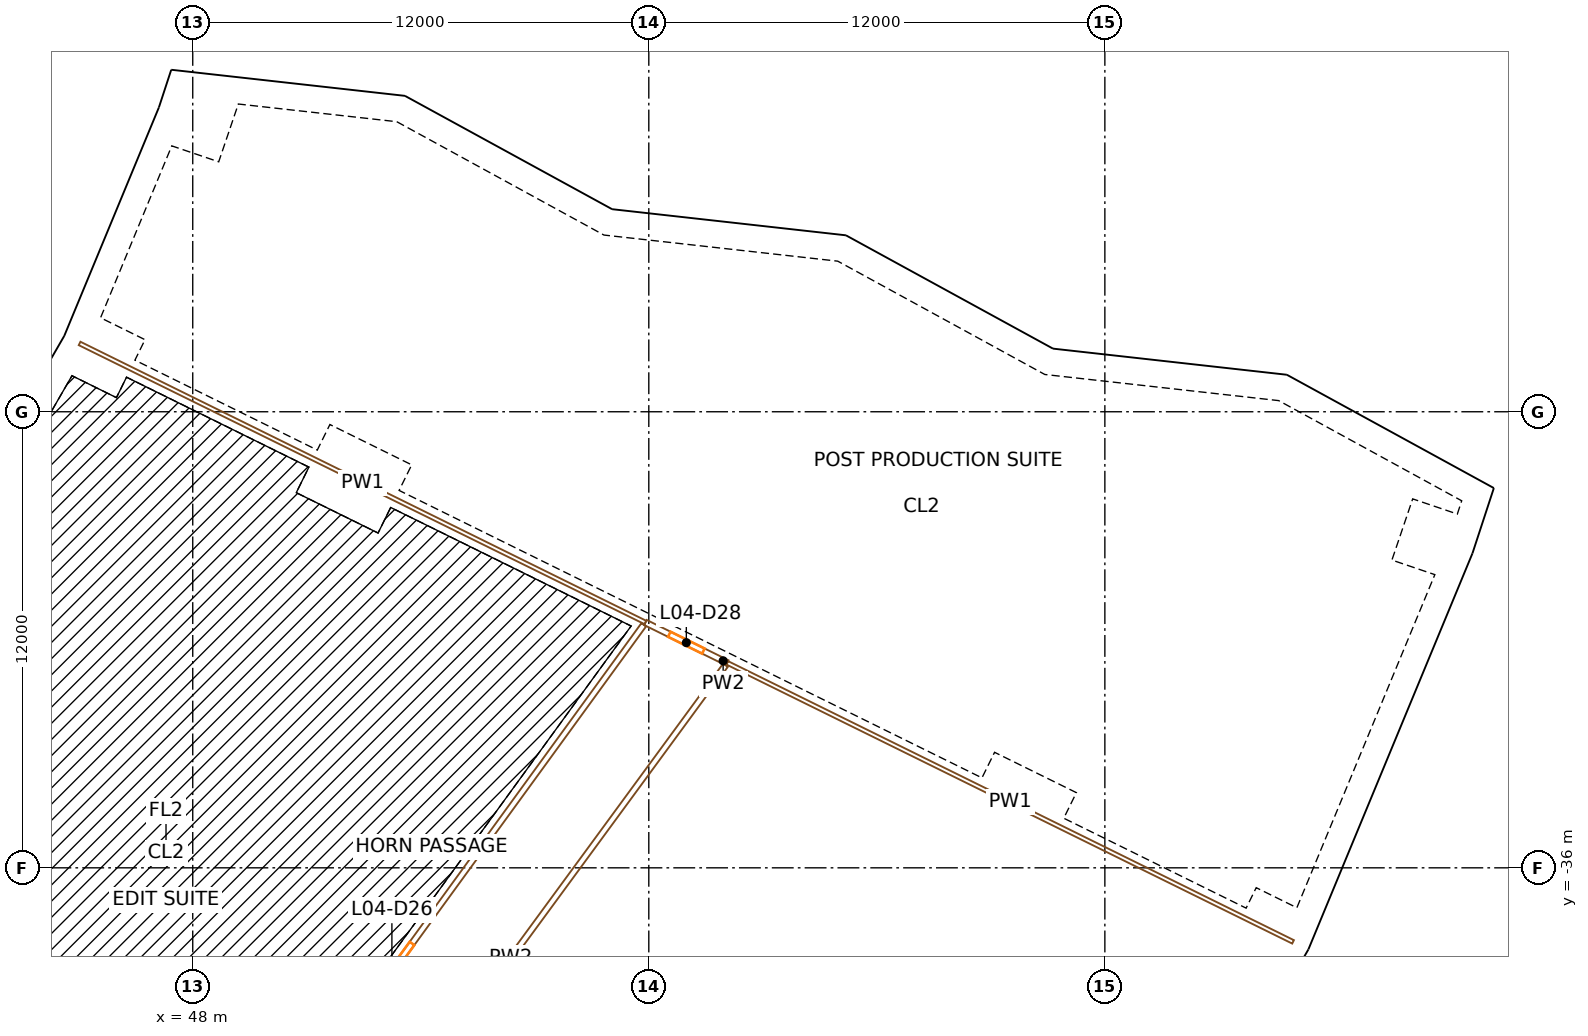
"""IFC4 building model, lengths in metres.
Left out: names, types, materials, properties, quantities, classifications, styles, units other than length and angle.
Written with IfcOpenShell. Run it as: python <this file> out.ifc"""

import sys

from ifc_helpers import new_model, si_unit, direction, frame, frame_2d, origin, origin_2d, place, context, subcontext, project, spatial, rectangle, extrude, element, fill, save


model = new_model("IFC4")
c1 = context("Model", 3, precision=1e-05, world=origin(), true_north=direction((0.0, 1.0)))
c2 = subcontext(c1, "Body", "Model", "MODEL_VIEW")
j1 = project(units=[si_unit("LENGTHUNIT", "METRE"), si_unit("PLANEANGLEUNIT", "RADIAN")], contexts=[c1])
p1 = place(None, origin())
s1 = spatial("IfcSite", under=j1, at=p1, CompositionType="ELEMENT")
p2 = place(p1, origin())
s2 = spatial("IfcBuilding", under=s1, at=p2, CompositionType="ELEMENT")
p3 = place(p2, frame((0.0, 0.0, 31.5)))
s3 = spatial("IfcBuildingStorey", under=s2, at=p3, CompositionType="ELEMENT", Elevation=31.5)
for number, where, z_axis, x_axis in (
    (1, (43.795, -38.407, 0.0), (0.0, 0.0, 1.0), (0.659, 0.752, 0.0)),
    (2, (48.433, -32.362, 0.0), (0.0, 0.0, 1.0), (0.556, 0.831, 0.0)),
):
    element("IfcColumn", number, at=place(p3, frame(where, z_axis=z_axis, x_axis=x_axis)), inside=s3, PredefinedType="COLUMN", context=c2, shape_type="SweptSolid", body=[
        extrude(rectangle(XDim=1.4, YDim=1.8, at=origin_2d()), origin(), (0.0, 0.0, 1.0), 4.5),
    ])
p4 = place(p3, frame((45.516, -22.446, 0.0), z_axis=(0.0, 0.0, 1.0), x_axis=(0.442288690219, 0.896872741533, 0.0)))
e3 = element("IfcColumn", 3, at=p4, inside=s3, PredefinedType="COLUMN", context=c2, shape_type="SweptSolid", body=[
    extrude(rectangle(XDim=1.1, YDim=1.3, at=origin_2d()), origin(), (0.0, 0.0, 1.0), 4.5),
])
for number, where, z_axis, x_axis in (
    (4, (52.243, -25.763, 0.0), (0.0, 0.0, 1.0), (0.442, 0.897, 0.0)),
    (5, (69.732, -34.388, 0.0), (0.0, 0.0, 1.0), (0.442, 0.897, 0.0)),
):
    element("IfcColumn", number, at=place(p3, frame(where, z_axis=z_axis, x_axis=x_axis)), inside=s3, PredefinedType="COLUMN", context=c2, shape_type="SweptSolid", body=[
        extrude(rectangle(XDim=1.4, YDim=1.8, at=origin_2d()), origin(), (0.0, 0.0, 1.0), 4.5),
    ])
for number, where, z_axis, x_axis in (
    (6, (76.458, -37.705, 0.0), (0.0, 0.0, 1.0), (0.442, 0.897, 0.0)),
    (7, (48.057, -16.313, 0.0), (0.0, 0.0, 1.0), (0.321, 0.947, 0.0)),
):
    element("IfcColumn", number, at=place(p3, frame(where, z_axis=z_axis, x_axis=x_axis)), inside=s3, PredefinedType="COLUMN", context=c2, shape_type="SweptSolid", body=[
        extrude(rectangle(XDim=1.1, YDim=1.3, at=origin_2d()), origin(), (0.0, 0.0, 1.0), 4.5),
    ])
for number, where, z_axis, x_axis in (
    (8, (55.159, -18.724, 0.0), (0.0, 0.0, 1.0), (0.321, 0.947, 0.0)),
    (9, (73.624, -24.992, 0.0), (0.0, 0.0, 1.0), (0.321, 0.947, 0.0)),
):
    element("IfcColumn", number, at=place(p3, frame(where, z_axis=z_axis, x_axis=x_axis)), inside=s3, PredefinedType="COLUMN", context=c2, shape_type="SweptSolid", body=[
        extrude(rectangle(XDim=1.4, YDim=1.8, at=origin_2d()), origin(), (0.0, 0.0, 1.0), 4.5),
    ])
p5 = place(p3, frame((80.726, -27.403, 0.0), z_axis=(0.0, 0.0, 1.0), x_axis=(0.321439465303, 0.946930129495, 0.0)))
e10 = element("IfcColumn", 10, at=p5, inside=s3, PredefinedType="COLUMN", context=c2, shape_type="SweptSolid", body=[
    extrude(rectangle(XDim=1.1, YDim=1.3, at=origin_2d()), origin(), (0.0, 0.0, 1.0), 4.5),
])
p6 = place(p3, frame((81.734, -25.99, 0.0), z_axis=(0.0, 0.0, 1.0), x_axis=(-0.877209140108, 0.480108450781, 0.0)))
e11 = element("IfcWall", 11, at=p6, inside=s3, PredefinedType="SOLIDWALL", context=c2, shape_type="SweptSolid", body=[
    extrude(rectangle(XDim=5.553, YDim=0.45, at=frame_2d((2.776, 0.0))), origin(), (0.0, 0.0, 1.0), 3.2),
])
p7 = place(p3, frame((76.804, -23.255, 0.0), z_axis=(0.0, 0.0, 1.0), x_axis=(-0.993813805196, 0.111059086081, 0.0)))
e12 = element("IfcWall", 12, at=p7, inside=s3, PredefinedType="SOLIDWALL", context=c2, shape_type="SweptSolid", body=[
    extrude(rectangle(XDim=6.362, YDim=0.45, at=frame_2d((3.181, 0.0))), origin(), (0.0, 0.0, 1.0), 3.2),
])
p8 = place(p3, frame((70.422, -22.479, 0.0), z_axis=(0.0, 0.0, 1.0), x_axis=(-0.877230259454, 0.480069861477, 0.0)))
e13 = element("IfcWall", 13, at=p8, inside=s3, PredefinedType="SOLIDWALL", context=c2, shape_type="SweptSolid", body=[
    extrude(rectangle(XDim=5.884, YDim=0.45, at=frame_2d((2.942, 0.0))), origin(), (0.0, 0.0, 1.0), 3.2),
])
p9 = place(p3, frame((65.202, -19.585, 0.0), z_axis=(0.0, 0.0, 1.0), x_axis=(-0.993818963433, 0.111012917816, 0.0)))
e14 = element("IfcWall", 14, at=p9, inside=s3, PredefinedType="SOLIDWALL", context=c2, shape_type="SweptSolid", body=[
    extrude(rectangle(XDim=6.36, YDim=0.45, at=frame_2d((3.18, 0.0))), origin(), (0.0, 0.0, 1.0), 3.2),
])
p10 = place(p3, frame((58.822, -18.81, 0.0), z_axis=(0.0, 0.0, 1.0), x_axis=(-0.87728135657, 0.479976480064, 0.0)))
e15 = element("IfcWall", 15, at=p10, inside=s3, PredefinedType="SOLIDWALL", context=c2, shape_type="SweptSolid", body=[
    extrude(rectangle(XDim=5.885, YDim=0.45, at=frame_2d((2.943, 0.0))), origin(), (0.0, 0.0, 1.0), 3.2),
])
p11 = place(p3, frame((53.599, -15.916, 0.0), z_axis=(0.0, 0.0, 1.0), x_axis=(-0.993827533543, 0.110936168908, 0.0)))
e16 = element("IfcWall", 16, at=p11, inside=s3, PredefinedType="SOLIDWALL", context=c2, shape_type="SweptSolid", body=[
    extrude(rectangle(XDim=6.265, YDim=0.45, at=frame_2d((3.133, 0.0))), origin(), (0.0, 0.0, 1.0), 3.2),
])
p12 = place(p3, frame((44.792, -22.155, 0.0), z_axis=(0.0, 0.0, 1.0), x_axis=(-0.50000447882, -0.866022817921, 0.0)))
e17 = element("IfcWall", 17, at=p12, inside=s3, PredefinedType="SOLIDWALL", context=c2, shape_type="SweptSolid", body=[
    extrude(rectangle(XDim=6.419, YDim=0.45, at=frame_2d((3.21, 0.0))), origin(), (0.0, 0.0, 1.0), 3.2),
])
p13 = place(p12, frame((3.66, 0.0, 0.9)))
e18 = element("IfcOpeningElement", 18, at=p13, cuts=e17, PredefinedType="OPENING", context=c2, shape_type="SweptSolid", body=[
    extrude(rectangle(XDim=1.2, YDim=2.15, at=frame_2d((0.6, 1.075))), frame((0.0, 0.235, 0.0), z_axis=(0.0, -1.0, 0.0), x_axis=(1.0, 0.0, 0.0)), (0.0, 0.0, 1.0), 0.47),
])
p14 = place(p12, frame((1.56, 0.0, 0.9)))
e19 = element("IfcOpeningElement", 19, at=p14, cuts=e17, PredefinedType="OPENING", context=c2, shape_type="SweptSolid", body=[
    extrude(rectangle(XDim=1.2, YDim=2.15, at=frame_2d((0.6, 1.075))), frame((0.0, 0.235, 0.0), z_axis=(0.0, -1.0, 0.0), x_axis=(1.0, 0.0, 0.0)), (0.0, 0.0, 1.0), 0.47),
])
p15 = place(p3, frame((47.327, -16.056, 0.0), z_axis=(0.0, 0.0, 1.0), x_axis=(-0.382692796414, -0.92387565374, 0.0)))
e20 = element("IfcWall", 20, at=p15, inside=s3, PredefinedType="SOLIDWALL", context=c2, shape_type="SweptSolid", body=[
    extrude(rectangle(XDim=6.576, YDim=0.45, at=frame_2d((3.288, 0.0))), origin(), (0.0, 0.0, 1.0), 3.2),
])
p16 = place(p15, frame((3.727, 0.0, 0.9)))
e21 = element("IfcOpeningElement", 21, at=p16, cuts=e20, PredefinedType="OPENING", context=c2, shape_type="SweptSolid", body=[
    extrude(rectangle(XDim=1.2, YDim=2.15, at=frame_2d((0.6, 1.075))), frame((0.0, 0.235, 0.0), z_axis=(0.0, -1.0, 0.0), x_axis=(1.0, 0.0, 0.0)), (0.0, 0.0, 1.0), 0.47),
])
p17 = place(p15, frame((1.627, 0.0, 0.9)))
e22 = element("IfcOpeningElement", 22, at=p17, cuts=e20, PredefinedType="OPENING", context=c2, shape_type="SweptSolid", body=[
    extrude(rectangle(XDim=1.2, YDim=2.15, at=frame_2d((0.6, 1.075))), frame((0.0, 0.235, 0.0), z_axis=(0.0, -1.0, 0.0), x_axis=(1.0, 0.0, 0.0)), (0.0, 0.0, 1.0), 0.47),
])
p18 = place(p3, frame((47.509, -15.497, 0.0), z_axis=(0.0, 0.0, 1.0), x_axis=(-0.311474670585, -0.950254455177, 0.0)))
e23 = element("IfcWall", 23, at=p18, inside=s3, PredefinedType="SOLIDWALL", context=c2, shape_type="SweptSolid", body=[
    extrude(rectangle(XDim=0.571, YDim=0.45, at=frame_2d((0.285, 0.0))), origin(), (0.0, 0.0, 1.0), 3.2),
])
p19 = place(p3, frame((71.512, -47.819, 0.0), z_axis=(0.0, 0.0, 1.0), x_axis=(0.500001430823, 0.866024577697, 0.0)))
e24 = element("IfcWall", 24, at=p19, inside=s3, PredefinedType="SOLIDWALL", context=c2, shape_type="SweptSolid", body=[
    extrude(rectangle(XDim=11.312, YDim=0.45, at=frame_2d((5.656, 0.0))), origin(), (0.0, 0.0, 1.0), 3.2),
])
p20 = place(p19, frame((4.006, 0.0, 0.9)))
e25 = element("IfcOpeningElement", 25, at=p20, cuts=e24, PredefinedType="OPENING", context=c2, shape_type="SweptSolid", body=[
    extrude(rectangle(XDim=1.2, YDim=2.15, at=frame_2d((0.6, 1.075))), frame((0.0, 0.235, 0.0), z_axis=(0.0, -1.0, 0.0), x_axis=(1.0, 0.0, 0.0)), (0.0, 0.0, 1.0), 0.47),
])
p21 = place(p19, frame((6.106, 0.0, 0.9)))
e26 = element("IfcOpeningElement", 26, at=p21, cuts=e24, PredefinedType="OPENING", context=c2, shape_type="SweptSolid", body=[
    extrude(rectangle(XDim=1.2, YDim=2.15, at=frame_2d((0.6, 1.075))), frame((0.0, 0.235, 0.0), z_axis=(0.0, -1.0, 0.0), x_axis=(1.0, 0.0, 0.0)), (0.0, 0.0, 1.0), 0.47),
])
p22 = place(p3, frame((77.176, -37.993, 0.0), z_axis=(0.0, 0.0, 1.0), x_axis=(0.382700611107, 0.923872416656, 0.0)))
e27 = element("IfcWall", 27, at=p22, inside=s3, PredefinedType="SOLIDWALL", context=c2, shape_type="SweptSolid", body=[
    extrude(rectangle(XDim=11.168, YDim=0.45, at=frame_2d((5.584, 0.0))), origin(), (0.0, 0.0, 1.0), 3.2),
])
p23 = place(p22, frame((3.917, 0.0, 0.9)))
e28 = element("IfcOpeningElement", 28, at=p23, cuts=e27, PredefinedType="OPENING", context=c2, shape_type="SweptSolid", body=[
    extrude(rectangle(XDim=1.2, YDim=2.15, at=frame_2d((0.6, 1.075))), frame((0.0, 0.235, 0.0), z_axis=(0.0, -1.0, 0.0), x_axis=(1.0, 0.0, 0.0)), (0.0, 0.0, 1.0), 0.47),
])
p24 = place(p22, frame((6.017, 0.0, 0.9)))
e29 = element("IfcOpeningElement", 29, at=p24, cuts=e27, PredefinedType="OPENING", context=c2, shape_type="SweptSolid", body=[
    extrude(rectangle(XDim=1.2, YDim=2.15, at=frame_2d((0.6, 1.075))), frame((0.0, 0.235, 0.0), z_axis=(0.0, -1.0, 0.0), x_axis=(1.0, 0.0, 0.0)), (0.0, 0.0, 1.0), 0.47),
])
p25 = place(p3, frame((81.457, -27.66, 0.0), z_axis=(0.0, 0.0, 1.0), x_axis=(0.311621150825, 0.95020642934, 0.0)))
e30 = element("IfcWall", 30, at=p25, inside=s3, PredefinedType="SOLIDWALL", context=c2, shape_type="SweptSolid", body=[
    extrude(rectangle(XDim=1.846, YDim=0.45, at=frame_2d((0.923, 0.0))), origin(), (0.0, 0.0, 1.0), 3.2),
])
p26 = place(p3, frame((46.614, -47.83, 0.0), z_axis=(0.0, 0.0, 1.0), x_axis=(0.588142064446, 0.808757634912, 0.0)))
e31 = element("IfcWall", 31, at=p26, inside=s3, PredefinedType="PARTITIONING", context=c2, shape_type="SweptSolid", body=[
    extrude(rectangle(XDim=22.534, YDim=0.15, at=frame_2d((11.267, 0.0))), origin(), (0.0, 0.0, 1.0), 3.1),
])
p27 = place(p26, frame((10.367, 0.0, 0.0)))
e32 = element("IfcOpeningElement", 32, at=p27, cuts=e31, PredefinedType="OPENING", context=c2, shape_type="SweptSolid", body=[
    extrude(rectangle(XDim=1.8, YDim=2.1, at=frame_2d((0.9, 1.05))), frame((0.0, 0.085, 0.0), z_axis=(0.0, -1.0, 0.0), x_axis=(1.0, 0.0, 0.0)), (0.0, 0.0, 1.0), 0.17),
])
p28 = place(p3, frame((62.019, -30.667, 0.0), z_axis=(0.0, 0.0, 1.0), x_axis=(-0.59135701849, -0.806409868915, 0.0)))
e33 = element("IfcWall", 33, at=p28, inside=s3, PredefinedType="PARTITIONING", context=c2, shape_type="SweptSolid", body=[
    extrude(rectangle(XDim=23.892, YDim=0.15, at=frame_2d((11.946, 0.0))), origin(), (0.0, 0.0, 1.0), 3.1),
])
p29 = place(p28, frame((11.046, 0.0, 0.0)))
e34 = element("IfcOpeningElement", 34, at=p29, cuts=e33, PredefinedType="OPENING", context=c2, shape_type="SweptSolid", body=[
    extrude(rectangle(XDim=1.8, YDim=2.1, at=frame_2d((0.9, 1.05))), frame((0.0, 0.085, 0.0), z_axis=(0.0, -1.0, 0.0), x_axis=(1.0, 0.0, 0.0)), (0.0, 0.0, 1.0), 0.17),
])
p30 = place(p3, frame((59.911, -29.545, 0.0), z_axis=(0.0, 0.0, 1.0), x_axis=(-0.896872708689, 0.44228875682, 0.0)))
e35 = element("IfcWall", 35, at=p30, inside=s3, PredefinedType="PARTITIONING", context=c2, shape_type="SweptSolid", body=[
    extrude(rectangle(XDim=16.6, YDim=0.1, at=frame_2d((8.3, 0.0))), origin(), (0.0, 0.0, 1.0), 3.1),
])
p31 = place(p3, frame((59.911, -29.545, 0.0), z_axis=(0.0, 0.0, 1.0), x_axis=(0.896855391649, -0.442323870564, 0.0)))
e36 = element("IfcWall", 36, at=p31, inside=s3, PredefinedType="PARTITIONING", context=c2, shape_type="SweptSolid", body=[
    extrude(rectangle(XDim=2.4, YDim=0.15, at=frame_2d((1.2, 0.0))), origin(), (0.0, 0.0, 1.0), 3.1),
])
p32 = place(p31, frame((0.7, 0.0, 0.0)))
e37 = element("IfcOpeningElement", 37, at=p32, cuts=e36, PredefinedType="OPENING", context=c2, shape_type="SweptSolid", body=[
    extrude(rectangle(XDim=1.0, YDim=2.1, at=frame_2d((0.5, 1.05))), frame((0.0, 0.085, 0.0), z_axis=(0.0, -1.0, 0.0), x_axis=(1.0, 0.0, 0.0)), (0.0, 0.0, 1.0), 0.17),
])
p33 = place(p3, frame((76.952, -37.948, 0.0), z_axis=(0.0, 0.0, 1.0), x_axis=(-0.896872708689, 0.44228875682, 0.0)))
e38 = element("IfcWall", 38, at=p33, inside=s3, PredefinedType="PARTITIONING", context=c2, shape_type="SweptSolid", body=[
    extrude(rectangle(XDim=16.6, YDim=0.1, at=frame_2d((8.3, 0.0))), origin(), (0.0, 0.0, 1.0), 3.1),
])
p34 = place(p23, origin())
e39 = element("IfcWindow", 39, at=p34, inside=s3, PartitioningType="SINGLE_PANEL", PredefinedType="WINDOW", context=c2, shape_type="SweptSolid", body=[
    extrude(rectangle(XDim=1.2, YDim=2.15, at=frame_2d((0.6, 1.075))), frame((0.0, 0.03, 0.0), z_axis=(0.0, -1.0, 0.0), x_axis=(1.0, 0.0, 0.0)), (0.0, 0.0, 1.0), 0.06),
])
fill(e28, e39)
p35 = place(p24, origin())
e40 = element("IfcWindow", 40, at=p35, inside=s3, PartitioningType="SINGLE_PANEL", PredefinedType="WINDOW", context=c2, shape_type="SweptSolid", body=[
    extrude(rectangle(XDim=1.2, YDim=2.15, at=frame_2d((0.6, 1.075))), frame((0.0, 0.03, 0.0), z_axis=(0.0, -1.0, 0.0), x_axis=(1.0, 0.0, 0.0)), (0.0, 0.0, 1.0), 0.06),
])
fill(e29, e40)
p36 = place(p16, origin())
e41 = element("IfcWindow", 41, at=p36, inside=s3, PartitioningType="SINGLE_PANEL", PredefinedType="WINDOW", context=c2, shape_type="SweptSolid", body=[
    extrude(rectangle(XDim=1.2, YDim=2.15, at=frame_2d((0.6, 1.075))), frame((0.0, 0.03, 0.0), z_axis=(0.0, -1.0, 0.0), x_axis=(1.0, 0.0, 0.0)), (0.0, 0.0, 1.0), 0.06),
])
fill(e21, e41)
p37 = place(p17, origin())
e42 = element("IfcWindow", 42, at=p37, inside=s3, PartitioningType="SINGLE_PANEL", PredefinedType="WINDOW", context=c2, shape_type="SweptSolid", body=[
    extrude(rectangle(XDim=1.2, YDim=2.15, at=frame_2d((0.6, 1.075))), frame((0.0, 0.03, 0.0), z_axis=(0.0, -1.0, 0.0), x_axis=(1.0, 0.0, 0.0)), (0.0, 0.0, 1.0), 0.06),
])
fill(e22, e42)
p38 = place(p27, origin())
e43 = element("IfcDoor", 43, at=p38, inside=s3, OperationType="DOUBLE_DOOR_SINGLE_SWING", PredefinedType="DOOR", context=c2, shape_type="SweptSolid", body=[
    extrude(rectangle(XDim=1.8, YDim=2.1, at=frame_2d((0.9, 1.05))), frame((0.0, 0.025, 0.0), z_axis=(0.0, -1.0, 0.0), x_axis=(1.0, 0.0, 0.0)), (0.0, 0.0, 1.0), 0.05),
])
fill(e32, e43)
p39 = place(p32, origin())
e44 = element("IfcDoor", 44, at=p39, inside=s3, OperationType="SINGLE_SWING_RIGHT", PredefinedType="DOOR", context=c2, shape_type="SweptSolid", body=[
    extrude(rectangle(XDim=1.0, YDim=2.1, at=frame_2d((0.5, 1.05))), frame((0.0, 0.025, 0.0), z_axis=(0.0, -1.0, 0.0), x_axis=(1.0, 0.0, 0.0)), (0.0, 0.0, 1.0), 0.05),
])
fill(e37, e44)
save(model, sys.argv[1])
